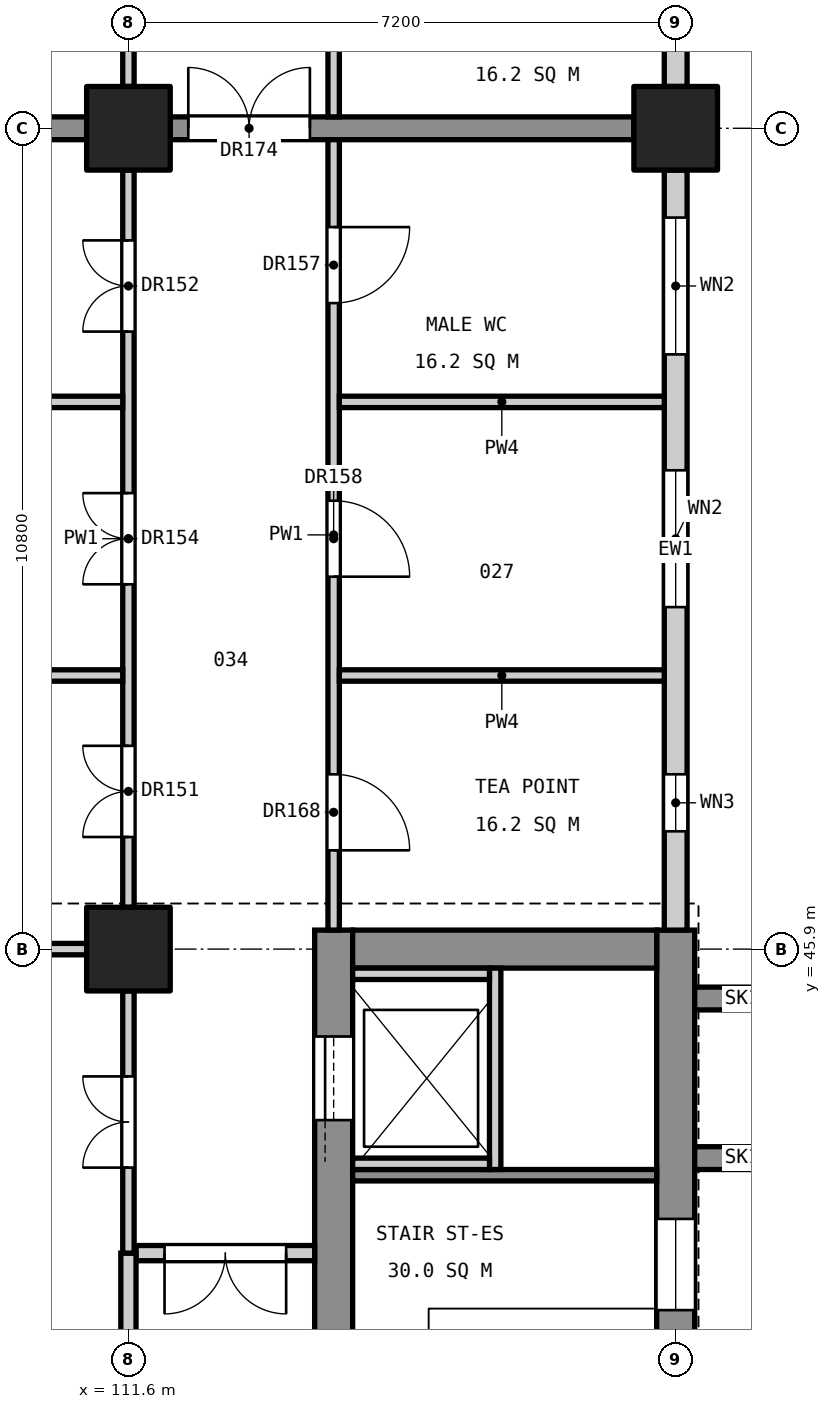
"""IFC4 building model, lengths in metres.
Left out: names, types, materials, properties, quantities, classifications, styles, units other than length and angle.
Written with IfcOpenShell. Run it as: python <this file> out.ifc"""

import sys

from ifc_helpers import new_model, si_unit, direction, frame, frame_2d, origin, origin_2d, place, context, subcontext, project, spatial, rectangle, extrude, element, fill, save


model = new_model("IFC4")
c1 = context("Model", 3, precision=1e-05, world=origin(), true_north=direction((0.0, 1.0)))
c2 = subcontext(c1, "Body", "Model", "MODEL_VIEW")
j1 = project(units=[si_unit("LENGTHUNIT", "METRE"), si_unit("PLANEANGLEUNIT", "RADIAN")], contexts=[c1])
p1 = place(None, origin())
s1 = spatial("IfcSite", under=j1, at=p1, CompositionType="ELEMENT")
p2 = place(p1, origin())
s2 = spatial("IfcBuilding", under=s1, at=p2, CompositionType="ELEMENT")
p3 = place(p2, frame((0.0, 0.0, 16.8)))
s3 = spatial("IfcBuildingStorey", under=s2, at=p3, CompositionType="ELEMENT", Elevation=16.8)
for number, where, z_axis, x_axis in (
    (1, (118.8, 56.7, 0.0), (0.0, 0.0, 1.0), (1.0, 0.0, 0.0)),
    (2, (111.6, 45.9, 0.0), (0.0, 0.0, 1.0), (1.0, 0.0, 0.0)),
    (3, (111.6, 56.7, 0.0), (0.0, 0.0, 1.0), (1.0, 0.0, 0.0)),
):
    element("IfcColumn", number, at=place(p3, frame(where, z_axis=z_axis, x_axis=x_axis)), inside=s3, PredefinedType="COLUMN", context=c2, shape_type="SweptSolid", body=[
        extrude(rectangle(XDim=1.1, YDim=1.1, at=origin_2d()), origin(), (0.0, 0.0, 1.0), 5.4),
    ])
p4 = place(p3, frame((118.8, 34.85, 0.0), z_axis=(0.0, 0.0, 1.0), x_axis=(0.0, 1.0, 0.0)))
e4 = element("IfcWall", 4, at=p4, inside=s3, PredefinedType="SHEAR", context=c2, shape_type="SweptSolid", body=[
    extrude(rectangle(XDim=11.3, YDim=0.5, at=frame_2d((5.65, 0.0))), origin(), (0.0, 0.0, 1.0), 5.15),
])
p5 = place(p4, frame((6.3, 0.0, 3.4)))
e5 = element("IfcOpeningElement", 5, at=p5, cuts=e4, PredefinedType="OPENING", context=c2, shape_type="SweptSolid", body=[
    extrude(rectangle(XDim=1.2, YDim=0.9, at=frame_2d((0.6, 0.45))), frame((0.0, 0.26, 0.0), z_axis=(0.0, -1.0, 0.0), x_axis=(1.0, 0.0, 0.0)), (0.0, 0.0, 1.0), 0.52),
])
p6 = place(p3, frame((114.3, 34.85, 0.0), z_axis=(0.0, 0.0, 1.0), x_axis=(0.0, 1.0, 0.0)))
e6 = element("IfcWall", 6, at=p6, inside=s3, PredefinedType="SHEAR", context=c2, shape_type="SweptSolid", body=[
    extrude(rectangle(XDim=11.3, YDim=0.5, at=frame_2d((5.65, 0.0))), origin(), (0.0, 0.0, 1.0), 5.15),
])
p7 = place(p6, frame((0.55, 0.0, 0.0)))
e7 = element("IfcOpeningElement", 7, at=p7, cuts=e6, PredefinedType="OPENING", context=c2, shape_type="SweptSolid", body=[
    extrude(rectangle(XDim=1.4, YDim=2.1, at=frame_2d((0.7, 1.05))), frame((0.0, 0.26, 0.0), z_axis=(0.0, -1.0, 0.0), x_axis=(1.0, 0.0, 0.0)), (0.0, 0.0, 1.0), 0.52),
])
p8 = place(p6, frame((8.8, 0.0, 0.0)))
e8 = element("IfcOpeningElement", 8, at=p8, cuts=e6, PredefinedType="OPENING", context=c2, shape_type="SweptSolid", body=[
    extrude(rectangle(XDim=1.1, YDim=2.1, at=frame_2d((0.55, 1.05))), frame((0.0, 0.26, 0.0), z_axis=(0.0, -1.0, 0.0), x_axis=(1.0, 0.0, 0.0)), (0.0, 0.0, 1.0), 0.52),
])
p9 = place(p3, frame((118.55, 45.9, 0.0), z_axis=(0.0, 0.0, 1.0), x_axis=(-1.0, 0.0, 0.0)))
e9 = element("IfcWall", 9, at=p9, inside=s3, PredefinedType="SHEAR", context=c2, shape_type="SweptSolid", body=[
    extrude(rectangle(XDim=4.0, YDim=0.5, at=frame_2d((2.0, 0.0))), origin(), (0.0, 0.0, 1.0), 5.15),
])
for number, where, z_axis, x_axis in (
    (10, (119.05, 43.15, 0.0), (0.0, 0.0, 1.0), (1.0, 0.0, 0.0)),
    (11, (119.05, 45.25, 0.0), (0.0, 0.0, 1.0), (1.0, 0.0, 0.0)),
):
    element("IfcWall", number, at=place(p3, frame(where, z_axis=z_axis, x_axis=x_axis)), inside=s3, PredefinedType="SHEAR", context=c2, shape_type="SweptSolid", body=[
        extrude(rectangle(XDim=1.25, YDim=0.3, at=frame_2d((0.625, 0.0))), origin(), (0.0, 0.0, 1.0), 5.4),
    ])
p10 = place(p3, frame((118.25, 56.7, 0.0), z_axis=(0.0, 0.0, 1.0), x_axis=(-1.0, 0.0, 0.0)))
e12 = element("IfcWall", 12, at=p10, inside=s3, PredefinedType="SHEAR", context=c2, shape_type="SweptSolid", body=[
    extrude(rectangle(XDim=6.1, YDim=0.3, at=frame_2d((3.05, 0.0))), origin(), (0.0, 0.0, 1.0), 5.15),
])
p11 = place(p10, frame((4.262, 0.0, 0.0)))
e13 = element("IfcOpeningElement", 13, at=p11, cuts=e12, PredefinedType="OPENING", context=c2, shape_type="SweptSolid", body=[
    extrude(rectangle(XDim=1.6, YDim=2.1, at=frame_2d((0.8, 1.05))), frame((0.0, 0.16, 0.0), z_axis=(0.0, -1.0, 0.0), x_axis=(1.0, 0.0, 0.0)), (0.0, 0.0, 1.0), 0.32),
])
p12 = place(p3, frame((111.05, 56.7, 0.0), z_axis=(0.0, 0.0, 1.0), x_axis=(-1.0, 0.0, 0.0)))
e14 = element("IfcWall", 14, at=p12, inside=s3, PredefinedType="SHEAR", context=c2, shape_type="SweptSolid", body=[
    extrude(rectangle(XDim=9.7, YDim=0.3, at=frame_2d((4.85, 0.0))), origin(), (0.0, 0.0, 1.0), 5.15),
])
p13 = place(p3, frame((118.55, 42.925, 0.0), z_axis=(0.0, 0.0, 1.0), x_axis=(-1.0, 0.0, 0.0)))
e15 = element("IfcWall", 15, at=p13, inside=s3, PredefinedType="SOLIDWALL", context=c2, shape_type="SweptSolid", body=[
    extrude(rectangle(XDim=4.0, YDim=0.15, at=frame_2d((2.0, 0.0))), origin(), (0.0, 0.0, 1.0), 5.15),
])
p14 = place(p3, frame((116.425, 43.0, 0.0), z_axis=(0.0, 0.0, 1.0), x_axis=(0.0, 1.0, 0.0)))
e16 = element("IfcWall", 16, at=p14, inside=s3, PredefinedType="SOLIDWALL", context=c2, shape_type="SweptSolid", body=[
    extrude(rectangle(XDim=2.65, YDim=0.15, at=frame_2d((1.325, 0.0))), origin(), (0.0, 0.0, 1.0), 5.4),
])
for number, where, z_axis, x_axis in (
    (17, (116.35, 43.075, 0.0), (0.0, 0.0, 1.0), (-1.0, 0.0, 0.0)),
    (18, (116.35, 45.575, 0.0), (0.0, 0.0, 1.0), (-1.0, 0.0, 0.0)),
):
    element("IfcWall", number, at=place(p3, frame(where, z_axis=z_axis, x_axis=x_axis)), inside=s3, PredefinedType="SOLIDWALL", context=c2, shape_type="SweptSolid", body=[
        extrude(rectangle(XDim=1.8, YDim=0.15, at=frame_2d((0.9, 0.0))), origin(), (0.0, 0.0, 1.0), 5.4),
    ])
p15 = place(p3, frame((118.8, 46.15, 0.0), z_axis=(0.0, 0.0, 1.0), x_axis=(0.0, 1.0, 0.0)))
e19 = element("IfcWall", 19, at=p15, inside=s3, PredefinedType="STANDARD", context=c2, shape_type="SweptSolid", body=[
    extrude(rectangle(XDim=10.0, YDim=0.3, at=frame_2d((5.0, 0.0))), origin(), (0.0, 0.0, 1.0), 4.25),
])
p16 = place(p15, frame((1.3, 0.0, 0.8)))
e20 = element("IfcOpeningElement", 20, at=p16, cuts=e19, PredefinedType="OPENING", context=c2, shape_type="SweptSolid", body=[
    extrude(rectangle(XDim=0.75, YDim=1.2, at=frame_2d((0.375, 0.6))), frame((0.0, 0.16, 0.0), z_axis=(0.0, -1.0, 0.0), x_axis=(1.0, 0.0, 0.0)), (0.0, 0.0, 1.0), 0.32),
])
p17 = place(p15, frame((4.25, 0.0, 0.9)))
e21 = element("IfcOpeningElement", 21, at=p17, cuts=e19, PredefinedType="OPENING", context=c2, shape_type="SweptSolid", body=[
    extrude(rectangle(XDim=1.8, YDim=3.0, at=frame_2d((0.9, 1.5))), frame((0.0, 0.16, 0.0), z_axis=(0.0, -1.0, 0.0), x_axis=(1.0, 0.0, 0.0)), (0.0, 0.0, 1.0), 0.32),
])
p18 = place(p15, frame((7.575, 0.0, 0.9)))
e22 = element("IfcOpeningElement", 22, at=p18, cuts=e19, PredefinedType="OPENING", context=c2, shape_type="SweptSolid", body=[
    extrude(rectangle(XDim=1.8, YDim=3.0, at=frame_2d((0.9, 1.5))), frame((0.0, 0.16, 0.0), z_axis=(0.0, -1.0, 0.0), x_axis=(1.0, 0.0, 0.0)), (0.0, 0.0, 1.0), 0.32),
])
p19 = place(p3, frame((118.8, 57.25, 0.0), z_axis=(0.0, 0.0, 1.0), x_axis=(0.0, 1.0, 0.0)))
e23 = element("IfcWall", 23, at=p19, inside=s3, PredefinedType="STANDARD", context=c2, shape_type="SweptSolid", body=[
    extrude(rectangle(XDim=2.8, YDim=0.3, at=frame_2d((1.4, 0.0))), origin(), (0.0, 0.0, 1.0), 4.25),
])
p20 = place(p19, frame((1.025, 0.0, 0.8)))
e24 = element("IfcOpeningElement", 24, at=p20, cuts=e23, PredefinedType="OPENING", context=c2, shape_type="SweptSolid", body=[
    extrude(rectangle(XDim=0.75, YDim=1.2, at=frame_2d((0.375, 0.6))), frame((0.0, 0.16, 0.0), z_axis=(0.0, -1.0, 0.0), x_axis=(1.0, 0.0, 0.0)), (0.0, 0.0, 1.0), 0.32),
])
p21 = place(p3, frame((114.3, 46.15, 0.0), z_axis=(0.0, 0.0, 1.0), x_axis=(0.0, 1.0, 0.0)))
e25 = element("IfcWall", 25, at=p21, inside=s3, PredefinedType="PARTITIONING", context=c2, shape_type="SweptSolid", body=[
    extrude(rectangle(XDim=10.4, YDim=0.15, at=frame_2d((5.2, 0.0))), origin(), (0.0, 0.0, 1.0), 4.05),
])
p22 = place(p21, frame((8.25, 0.0, 0.0)))
e26 = element("IfcOpeningElement", 26, at=p22, cuts=e25, PredefinedType="OPENING", context=c2, shape_type="SweptSolid", body=[
    extrude(rectangle(XDim=1.0, YDim=2.1, at=frame_2d((0.5, 1.05))), frame((0.0, 0.085, 0.0), z_axis=(0.0, -1.0, 0.0), x_axis=(1.0, 0.0, 0.0)), (0.0, 0.0, 1.0), 0.17),
])
p23 = place(p21, frame((4.65, 0.0, 0.0)))
e27 = element("IfcOpeningElement", 27, at=p23, cuts=e25, PredefinedType="OPENING", context=c2, shape_type="SweptSolid", body=[
    extrude(rectangle(XDim=1.0, YDim=2.1, at=frame_2d((0.5, 1.05))), frame((0.0, 0.085, 0.0), z_axis=(0.0, -1.0, 0.0), x_axis=(1.0, 0.0, 0.0)), (0.0, 0.0, 1.0), 0.17),
])
p24 = place(p21, frame((1.05, 0.0, 0.0)))
e28 = element("IfcOpeningElement", 28, at=p24, cuts=e25, PredefinedType="OPENING", context=c2, shape_type="SweptSolid", body=[
    extrude(rectangle(XDim=1.0, YDim=2.1, at=frame_2d((0.5, 1.05))), frame((0.0, 0.085, 0.0), z_axis=(0.0, -1.0, 0.0), x_axis=(1.0, 0.0, 0.0)), (0.0, 0.0, 1.0), 0.17),
])
p25 = place(p3, frame((114.3, 56.85, 0.0), z_axis=(0.0, 0.0, 1.0), x_axis=(0.0, 1.0, 0.0)))
e29 = element("IfcWall", 29, at=p25, inside=s3, PredefinedType="PARTITIONING", context=c2, shape_type="SweptSolid", body=[
    extrude(rectangle(XDim=3.2, YDim=0.15, at=frame_2d((1.6, 0.0))), origin(), (0.0, 0.0, 1.0), 4.05),
])
p26 = place(p25, frame((1.15, 0.0, 0.0)))
e30 = element("IfcOpeningElement", 30, at=p26, cuts=e29, PredefinedType="OPENING", context=c2, shape_type="SweptSolid", body=[
    extrude(rectangle(XDim=1.0, YDim=2.1, at=frame_2d((0.5, 1.05))), frame((0.0, 0.085, 0.0), z_axis=(0.0, -1.0, 0.0), x_axis=(1.0, 0.0, 0.0)), (0.0, 0.0, 1.0), 0.17),
])
for number, where, z_axis, x_axis in (
    (31, (118.65, 49.5, 0.0), (0.0, 0.0, 1.0), (-1.0, 0.0, 0.0)),
    (32, (118.65, 53.1, 0.0), (0.0, 0.0, 1.0), (-1.0, 0.0, 0.0)),
):
    element("IfcWall", number, at=place(p3, frame(where, z_axis=z_axis, x_axis=x_axis)), inside=s3, PredefinedType="PARTITIONING", context=c2, shape_type="SweptSolid", body=[
        extrude(rectangle(XDim=4.275, YDim=0.15, at=frame_2d((2.137, 0.0))), origin(), (0.0, 0.0, 1.0), 4.05),
    ])
p27 = place(p3, frame((114.05, 41.9, 0.0), z_axis=(0.0, 0.0, 1.0), x_axis=(-1.0, 0.0, 0.0)))
e33 = element("IfcWall", 33, at=p27, inside=s3, PredefinedType="PARTITIONING", context=c2, shape_type="SweptSolid", body=[
    extrude(rectangle(XDim=2.35, YDim=0.2, at=frame_2d((1.175, 0.0))), origin(), (0.0, 0.0, 1.0), 4.05),
])
p28 = place(p27, frame((0.375, 0.0, 0.0)))
e34 = element("IfcOpeningElement", 34, at=p28, cuts=e33, PredefinedType="OPENING", context=c2, shape_type="SweptSolid", body=[
    extrude(rectangle(XDim=1.6, YDim=2.1, at=frame_2d((0.8, 1.05))), frame((0.0, 0.11, 0.0), z_axis=(0.0, -1.0, 0.0), x_axis=(1.0, 0.0, 0.0)), (0.0, 0.0, 1.0), 0.22),
])
p29 = place(p3, frame((111.6, 35.65, 0.0), z_axis=(0.0, 0.0, 1.0), x_axis=(0.0, 1.0, 0.0)))
e35 = element("IfcWall", 35, at=p29, inside=s3, PredefinedType="PARTITIONING", context=c2, shape_type="SweptSolid", body=[
    extrude(rectangle(XDim=6.25, YDim=0.2, at=frame_2d((3.125, 0.0))), origin(), (0.0, 0.0, 1.0), 4.15),
])
p30 = place(p3, frame((111.6, 41.9, 0.0), z_axis=(0.0, 0.0, 1.0), x_axis=(0.0, 1.0, 0.0)))
e36 = element("IfcWall", 36, at=p30, inside=s3, PredefinedType="PARTITIONING", context=c2, shape_type="SweptSolid", body=[
    extrude(rectangle(XDim=3.45, YDim=0.15, at=frame_2d((1.725, 0.0))), origin(), (0.0, 0.0, 1.0), 4.15),
])
p31 = place(p30, frame((1.125, 0.0, 0.0)))
e37 = element("IfcOpeningElement", 37, at=p31, cuts=e36, PredefinedType="OPENING", context=c2, shape_type="SweptSolid", body=[
    extrude(rectangle(XDim=1.2, YDim=2.1, at=frame_2d((0.6, 1.05))), frame((0.0, 0.085, 0.0), z_axis=(0.0, -1.0, 0.0), x_axis=(1.0, 0.0, 0.0)), (0.0, 0.0, 1.0), 0.17),
])
p32 = place(p3, frame((111.6, 46.45, 0.0), z_axis=(0.0, 0.0, 1.0), x_axis=(0.0, 1.0, 0.0)))
e38 = element("IfcWall", 38, at=p32, inside=s3, PredefinedType="PARTITIONING", context=c2, shape_type="SweptSolid", body=[
    extrude(rectangle(XDim=9.7, YDim=0.15, at=frame_2d((4.85, 0.0))), origin(), (0.0, 0.0, 1.0), 4.15),
])
p33 = place(p32, frame((0.925, 0.0, 0.0)))
e39 = element("IfcOpeningElement", 39, at=p33, cuts=e38, PredefinedType="OPENING", context=c2, shape_type="SweptSolid", body=[
    extrude(rectangle(XDim=1.2, YDim=2.1, at=frame_2d((0.6, 1.05))), frame((0.0, 0.085, 0.0), z_axis=(0.0, -1.0, 0.0), x_axis=(1.0, 0.0, 0.0)), (0.0, 0.0, 1.0), 0.17),
])
p34 = place(p32, frame((7.575, 0.0, 0.0)))
e40 = element("IfcOpeningElement", 40, at=p34, cuts=e38, PredefinedType="OPENING", context=c2, shape_type="SweptSolid", body=[
    extrude(rectangle(XDim=1.2, YDim=2.1, at=frame_2d((0.6, 1.05))), frame((0.0, 0.085, 0.0), z_axis=(0.0, -1.0, 0.0), x_axis=(1.0, 0.0, 0.0)), (0.0, 0.0, 1.0), 0.17),
])
p35 = place(p32, frame((4.25, 0.0, 0.0)))
e41 = element("IfcOpeningElement", 41, at=p35, cuts=e38, PredefinedType="OPENING", context=c2, shape_type="SweptSolid", body=[
    extrude(rectangle(XDim=1.2, YDim=2.1, at=frame_2d((0.6, 1.05))), frame((0.0, 0.085, 0.0), z_axis=(0.0, -1.0, 0.0), x_axis=(1.0, 0.0, 0.0)), (0.0, 0.0, 1.0), 0.17),
])
p36 = place(p3, frame((111.6, 57.25, 0.0), z_axis=(0.0, 0.0, 1.0), x_axis=(0.0, 1.0, 0.0)))
e42 = element("IfcWall", 42, at=p36, inside=s3, PredefinedType="PARTITIONING", context=c2, shape_type="SweptSolid", body=[
    extrude(rectangle(XDim=3.05, YDim=0.15, at=frame_2d((1.525, 0.0))), origin(), (0.0, 0.0, 1.0), 4.15),
])
p37 = place(p3, frame((111.05, 45.9, 0.0), z_axis=(0.0, 0.0, 1.0), x_axis=(-1.0, 0.0, 0.0)))
e43 = element("IfcWall", 43, at=p37, inside=s3, PredefinedType="PARTITIONING", context=c2, shape_type="SweptSolid", body=[
    extrude(rectangle(XDim=9.7, YDim=0.15, at=frame_2d((4.85, 0.0))), origin(), (0.0, 0.0, 1.0), 4.05),
])
for number, where, z_axis, x_axis in (
    (44, (111.525, 49.5, 0.0), (0.0, 0.0, 1.0), (-1.0, 0.0, 0.0)),
    (45, (111.525, 53.1, 0.0), (0.0, 0.0, 1.0), (-1.0, 0.0, 0.0)),
):
    element("IfcWall", number, at=place(p3, frame(where, z_axis=z_axis, x_axis=x_axis)), inside=s3, PredefinedType="PARTITIONING", context=c2, shape_type="SweptSolid", body=[
        extrude(rectangle(XDim=10.575, YDim=0.15, at=frame_2d((5.288, 0.0))), origin(), (0.0, 0.0, 1.0), 4.05),
    ])
p38 = place(p8, origin())
e46 = element("IfcDoor", 46, at=p38, inside=s3, OperationType="SLIDING_TO_LEFT", PredefinedType="DOOR", context=c2, shape_type="SweptSolid", body=[
    extrude(rectangle(XDim=1.1, YDim=2.1, at=frame_2d((0.55, 1.05))), frame((0.0, 0.025, 0.0), z_axis=(0.0, -1.0, 0.0), x_axis=(1.0, 0.0, 0.0)), (0.0, 0.0, 1.0), 0.05),
])
fill(e8, e46)
p39 = place(p16, origin())
e47 = element("IfcWindow", 47, at=p39, inside=s3, PartitioningType="SINGLE_PANEL", PredefinedType="WINDOW", context=c2, shape_type="SweptSolid", body=[
    extrude(rectangle(XDim=0.75, YDim=1.2, at=frame_2d((0.375, 0.6))), frame((0.0, 0.03, 0.0), z_axis=(0.0, -1.0, 0.0), x_axis=(1.0, 0.0, 0.0)), (0.0, 0.0, 1.0), 0.06),
])
fill(e20, e47)
p40 = place(p17, origin())
e48 = element("IfcWindow", 48, at=p40, inside=s3, PartitioningType="SINGLE_PANEL", PredefinedType="WINDOW", context=c2, shape_type="SweptSolid", body=[
    extrude(rectangle(XDim=1.8, YDim=3.0, at=frame_2d((0.9, 1.5))), frame((0.0, 0.03, 0.0), z_axis=(0.0, -1.0, 0.0), x_axis=(1.0, 0.0, 0.0)), (0.0, 0.0, 1.0), 0.06),
])
fill(e21, e48)
p41 = place(p18, origin())
e49 = element("IfcWindow", 49, at=p41, inside=s3, PartitioningType="SINGLE_PANEL", PredefinedType="WINDOW", context=c2, shape_type="SweptSolid", body=[
    extrude(rectangle(XDim=1.8, YDim=3.0, at=frame_2d((0.9, 1.5))), frame((0.0, 0.03, 0.0), z_axis=(0.0, -1.0, 0.0), x_axis=(1.0, 0.0, 0.0)), (0.0, 0.0, 1.0), 0.06),
])
fill(e22, e49)
p42 = place(p5, origin())
e50 = element("IfcWindow", 50, at=p42, inside=s3, PartitioningType="SINGLE_PANEL", PredefinedType="WINDOW", context=c2, shape_type="SweptSolid", body=[
    extrude(rectangle(XDim=1.2, YDim=0.9, at=frame_2d((0.6, 0.45))), frame((0.0, 0.03, 0.0), z_axis=(0.0, -1.0, 0.0), x_axis=(1.0, 0.0, 0.0)), (0.0, 0.0, 1.0), 0.06),
])
fill(e5, e50)
p43 = place(p33, origin())
e51 = element("IfcDoor", 51, at=p43, inside=s3, OperationType="DOUBLE_DOOR_SINGLE_SWING", PredefinedType="DOOR", context=c2, shape_type="SweptSolid", body=[
    extrude(rectangle(XDim=1.2, YDim=2.1, at=frame_2d((0.6, 1.05))), frame((0.0, 0.025, 0.0), z_axis=(0.0, -1.0, 0.0), x_axis=(1.0, 0.0, 0.0)), (0.0, 0.0, 1.0), 0.05),
])
fill(e39, e51)
p44 = place(p34, origin())
e52 = element("IfcDoor", 52, at=p44, inside=s3, OperationType="DOUBLE_DOOR_SINGLE_SWING", PredefinedType="DOOR", context=c2, shape_type="SweptSolid", body=[
    extrude(rectangle(XDim=1.2, YDim=2.1, at=frame_2d((0.6, 1.05))), frame((0.0, 0.025, 0.0), z_axis=(0.0, -1.0, 0.0), x_axis=(1.0, 0.0, 0.0)), (0.0, 0.0, 1.0), 0.05),
])
fill(e40, e52)
p45 = place(p31, origin())
e53 = element("IfcDoor", 53, at=p45, inside=s3, OperationType="DOUBLE_DOOR_SINGLE_SWING", PredefinedType="DOOR", context=c2, shape_type="SweptSolid", body=[
    extrude(rectangle(XDim=1.2, YDim=2.1, at=frame_2d((0.6, 1.05))), frame((0.0, 0.025, 0.0), z_axis=(0.0, -1.0, 0.0), x_axis=(1.0, 0.0, 0.0)), (0.0, 0.0, 1.0), 0.05),
])
fill(e37, e53)
p46 = place(p35, origin())
e54 = element("IfcDoor", 54, at=p46, inside=s3, OperationType="DOUBLE_DOOR_SINGLE_SWING", PredefinedType="DOOR", context=c2, shape_type="SweptSolid", body=[
    extrude(rectangle(XDim=1.2, YDim=2.1, at=frame_2d((0.6, 1.05))), frame((0.0, 0.025, 0.0), z_axis=(0.0, -1.0, 0.0), x_axis=(1.0, 0.0, 0.0)), (0.0, 0.0, 1.0), 0.05),
])
fill(e41, e54)
p47 = place(p22, frame((1.0, 0.0, 0.0), z_axis=(0.0, 0.0, 1.0), x_axis=(-1.0, 0.0, 0.0)))
e55 = element("IfcDoor", 55, at=p47, inside=s3, OperationType="SINGLE_SWING_LEFT", PredefinedType="DOOR", context=c2, shape_type="SweptSolid", body=[
    extrude(rectangle(XDim=1.0, YDim=2.1, at=frame_2d((0.5, 1.05))), frame((0.0, 0.025, 0.0), z_axis=(0.0, -1.0, 0.0), x_axis=(1.0, 0.0, 0.0)), (0.0, 0.0, 1.0), 0.05),
])
fill(e26, e55)
p48 = place(p23, frame((1.0, 0.0, 0.0), z_axis=(0.0, 0.0, 1.0), x_axis=(-1.0, 0.0, 0.0)))
e56 = element("IfcDoor", 56, at=p48, inside=s3, OperationType="SINGLE_SWING_RIGHT", PredefinedType="DOOR", context=c2, shape_type="SweptSolid", body=[
    extrude(rectangle(XDim=1.0, YDim=2.1, at=frame_2d((0.5, 1.05))), frame((0.0, 0.025, 0.0), z_axis=(0.0, -1.0, 0.0), x_axis=(1.0, 0.0, 0.0)), (0.0, 0.0, 1.0), 0.05),
])
fill(e27, e56)
p49 = place(p24, frame((1.0, 0.0, 0.0), z_axis=(0.0, 0.0, 1.0), x_axis=(-1.0, 0.0, 0.0)))
e57 = element("IfcDoor", 57, at=p49, inside=s3, OperationType="SINGLE_SWING_RIGHT", PredefinedType="DOOR", context=c2, shape_type="SweptSolid", body=[
    extrude(rectangle(XDim=1.0, YDim=2.1, at=frame_2d((0.5, 1.05))), frame((0.0, 0.025, 0.0), z_axis=(0.0, -1.0, 0.0), x_axis=(1.0, 0.0, 0.0)), (0.0, 0.0, 1.0), 0.05),
])
fill(e28, e57)
p50 = place(p28, origin())
e58 = element("IfcDoor", 58, at=p50, inside=s3, OperationType="DOUBLE_DOOR_SINGLE_SWING", PredefinedType="DOOR", context=c2, shape_type="SweptSolid", body=[
    extrude(rectangle(XDim=1.6, YDim=2.1, at=frame_2d((0.8, 1.05))), frame((0.0, 0.025, 0.0), z_axis=(0.0, -1.0, 0.0), x_axis=(1.0, 0.0, 0.0)), (0.0, 0.0, 1.0), 0.05),
])
fill(e34, e58)
p51 = place(p11, frame((1.6, 0.0, 0.0), z_axis=(0.0, 0.0, 1.0), x_axis=(-1.0, 0.0, 0.0)))
e59 = element("IfcDoor", 59, at=p51, inside=s3, OperationType="DOUBLE_DOOR_SINGLE_SWING", PredefinedType="DOOR", context=c2, shape_type="SweptSolid", body=[
    extrude(rectangle(XDim=1.6, YDim=2.1, at=frame_2d((0.8, 1.05))), frame((0.0, 0.025, 0.0), z_axis=(0.0, -1.0, 0.0), x_axis=(1.0, 0.0, 0.0)), (0.0, 0.0, 1.0), 0.05),
])
fill(e13, e59)
save(model, sys.argv[1])
